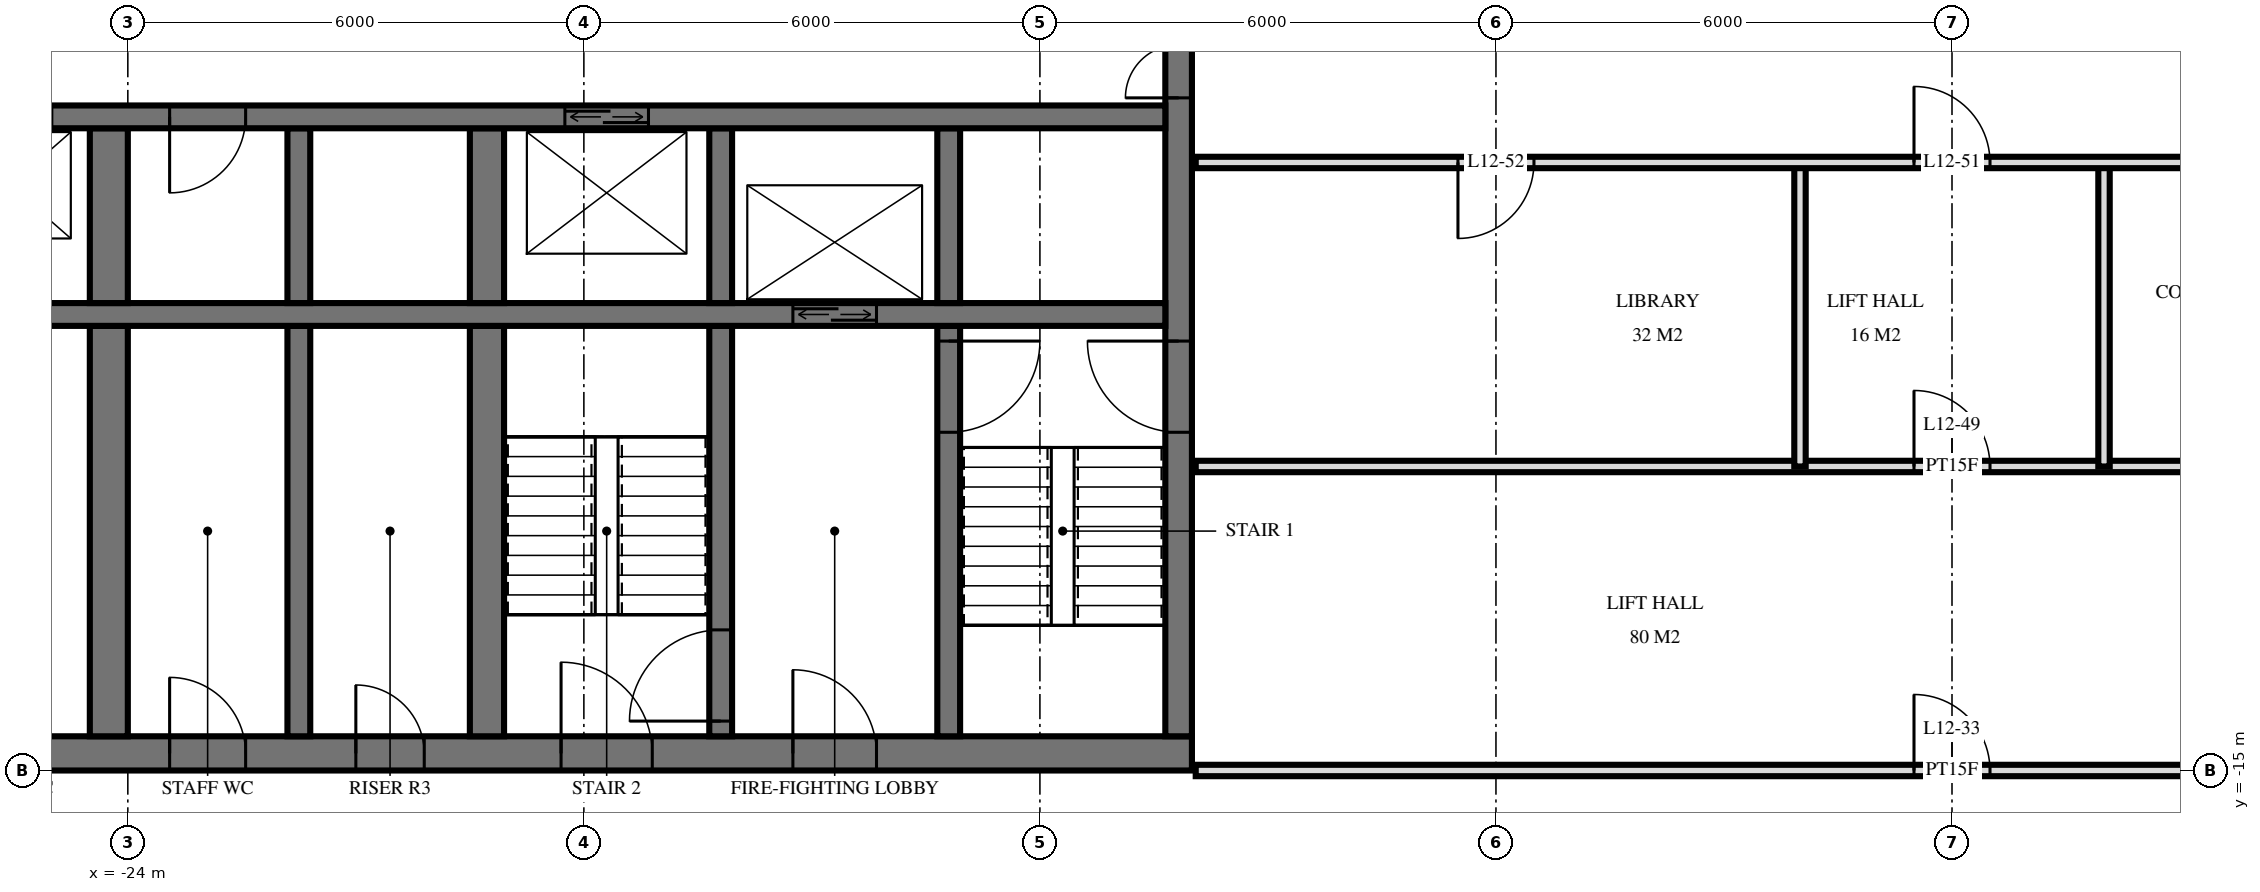
"""IFC4 building model, lengths in metres.
Left out: names, types, materials, properties, quantities, classifications, styles, units other than length and angle.
Written with IfcOpenShell. Run it as: python <this file> out.ifc"""

import sys

from ifc_helpers import new_model, si_unit, direction, frame, frame_2d, origin, place, context, subcontext, project, spatial, rectangle, extrude, element, fill, save


model = new_model("IFC4")
c1 = context("Model", 3, precision=1e-05, world=origin(), true_north=direction((0.0, 1.0)))
c2 = subcontext(c1, "Body", "Model", "MODEL_VIEW")
j1 = project(units=[si_unit("LENGTHUNIT", "METRE"), si_unit("PLANEANGLEUNIT", "RADIAN")], contexts=[c1])
p1 = place(None, origin())
s1 = spatial("IfcSite", under=j1, at=p1, CompositionType="ELEMENT")
p2 = place(p1, origin())
s2 = spatial("IfcBuilding", under=s1, at=p2, CompositionType="ELEMENT")
p3 = place(p2, frame((0.0, 0.0, 52.8)))
s3 = spatial("IfcBuildingStorey", under=s2, at=p3, CompositionType="ELEMENT", Elevation=52.8)
p4 = place(p3, frame((-29.5, -14.775, 0.0), z_axis=(0.0, 0.0, 1.0), x_axis=(1.0, 0.0, 0.0)))
e1 = element("IfcWall", 1, at=p4, inside=s3, PredefinedType="SHEAR", context=c2, shape_type="SweptSolid", body=[
    extrude(rectangle(XDim=19.5, YDim=0.45, at=frame_2d((9.75, 0.0))), origin(), (0.0, 0.0, 1.0), 3.6),
])
p5 = place(p4, frame((11.2, 0.0, 0.0)))
e2 = element("IfcOpeningElement", 2, at=p5, cuts=e1, PredefinedType="OPENING", context=c2, shape_type="SweptSolid", body=[
    extrude(rectangle(XDim=1.2, YDim=2.1, at=frame_2d((0.6, 1.05))), frame((0.0, 0.235, 0.0), z_axis=(0.0, -1.0, 0.0), x_axis=(1.0, 0.0, 0.0)), (0.0, 0.0, 1.0), 0.47),
])
p6 = place(p4, frame((14.25, 0.0, 0.0)))
e3 = element("IfcOpeningElement", 3, at=p6, cuts=e1, PredefinedType="OPENING", context=c2, shape_type="SweptSolid", body=[
    extrude(rectangle(XDim=1.1, YDim=2.1, at=frame_2d((0.55, 1.05))), frame((0.0, 0.235, 0.0), z_axis=(0.0, -1.0, 0.0), x_axis=(1.0, 0.0, 0.0)), (0.0, 0.0, 1.0), 0.47),
])
p7 = place(p4, frame((8.5, 0.0, 0.0)))
e4 = element("IfcOpeningElement", 4, at=p7, cuts=e1, PredefinedType="OPENING", context=c2, shape_type="SweptSolid", body=[
    extrude(rectangle(XDim=0.9, YDim=2.1, at=frame_2d((0.45, 1.05))), frame((0.0, 0.235, 0.0), z_axis=(0.0, -1.0, 0.0), x_axis=(1.0, 0.0, 0.0)), (0.0, 0.0, 1.0), 0.47),
])
p8 = place(p4, frame((6.05, 0.0, 0.0)))
e5 = element("IfcOpeningElement", 5, at=p8, cuts=e1, PredefinedType="OPENING", context=c2, shape_type="SweptSolid", body=[
    extrude(rectangle(XDim=1.0, YDim=2.1, at=frame_2d((0.5, 1.05))), frame((0.0, 0.235, 0.0), z_axis=(0.0, -1.0, 0.0), x_axis=(1.0, 0.0, 0.0)), (0.0, 0.0, 1.0), 0.47),
])
p9 = place(p4, frame((3.413, 0.0, 0.0)))
e6 = element("IfcOpeningElement", 6, at=p9, cuts=e1, PredefinedType="OPENING", context=c2, shape_type="SweptSolid", body=[
    extrude(rectangle(XDim=1.0, YDim=2.1, at=frame_2d((0.5, 1.05))), frame((0.0, 0.235, 0.0), z_axis=(0.0, -1.0, 0.0), x_axis=(1.0, 0.0, 0.0)), (0.0, 0.0, 1.0), 0.47),
])
p10 = place(p4, frame((1.087, 0.0, 0.0)))
e7 = element("IfcOpeningElement", 7, at=p10, cuts=e1, PredefinedType="OPENING", context=c2, shape_type="SweptSolid", body=[
    extrude(rectangle(XDim=1.0, YDim=2.1, at=frame_2d((0.5, 1.05))), frame((0.0, 0.235, 0.0), z_axis=(0.0, -1.0, 0.0), x_axis=(1.0, 0.0, 0.0)), (0.0, 0.0, 1.0), 0.47),
])
p11 = place(p3, frame((-10.175, -14.55, 0.0), z_axis=(0.0, 0.0, 1.0), x_axis=(0.0, 1.0, 0.0)))
e8 = element("IfcWall", 8, at=p11, inside=s3, PredefinedType="SHEAR", context=c2, shape_type="SweptSolid", body=[
    extrude(rectangle(XDim=14.1, YDim=0.35, at=frame_2d((7.05, 0.0))), origin(), (0.0, 0.0, 1.0), 3.6),
])
p12 = place(p11, frame((8.4, 0.0, 0.0)))
e9 = element("IfcOpeningElement", 9, at=p12, cuts=e8, PredefinedType="OPENING", context=c2, shape_type="SweptSolid", body=[
    extrude(rectangle(XDim=1.4, YDim=2.4, at=frame_2d((0.7, 1.2))), frame((0.0, 0.185, 0.0), z_axis=(0.0, -1.0, 0.0), x_axis=(1.0, 0.0, 0.0)), (0.0, 0.0, 1.0), 0.37),
])
p13 = place(p11, frame((10.0, 0.0, 0.0)))
e10 = element("IfcOpeningElement", 10, at=p13, cuts=e8, PredefinedType="OPENING", context=c2, shape_type="SweptSolid", body=[
    extrude(rectangle(XDim=1.4, YDim=2.4, at=frame_2d((0.7, 1.2))), frame((0.0, 0.185, 0.0), z_axis=(0.0, -1.0, 0.0), x_axis=(1.0, 0.0, 0.0)), (0.0, 0.0, 1.0), 0.37),
])
p14 = place(p11, frame((4.0, 0.0, 0.0)))
e11 = element("IfcOpeningElement", 11, at=p14, cuts=e8, PredefinedType="OPENING", context=c2, shape_type="SweptSolid", body=[
    extrude(rectangle(XDim=1.2, YDim=2.1, at=frame_2d((0.6, 1.05))), frame((0.0, 0.185, 0.0), z_axis=(0.0, -1.0, 0.0), x_axis=(1.0, 0.0, 0.0)), (0.0, 0.0, 1.0), 0.37),
])
p15 = place(p3, frame((-29.05, -6.4, 0.0), z_axis=(0.0, 0.0, 1.0), x_axis=(1.0, 0.0, 0.0)))
e12 = element("IfcWall", 12, at=p15, inside=s3, PredefinedType="SHEAR", context=c2, shape_type="SweptSolid", body=[
    extrude(rectangle(XDim=18.7, YDim=0.3, at=frame_2d((9.35, 0.0))), origin(), (0.0, 0.0, 1.0), 3.6),
])
p16 = place(p15, frame((2.95, 0.0, 0.0)))
e13 = element("IfcOpeningElement", 13, at=p16, cuts=e12, PredefinedType="OPENING", context=c2, shape_type="SweptSolid", body=[
    extrude(rectangle(XDim=1.1, YDim=2.1, at=frame_2d((0.55, 1.05))), frame((0.0, 0.16, 0.0), z_axis=(0.0, -1.0, 0.0), x_axis=(1.0, 0.0, 0.0)), (0.0, 0.0, 1.0), 0.32),
])
p17 = place(p15, frame((0.55, 0.0, 0.0)))
e14 = element("IfcOpeningElement", 14, at=p17, cuts=e12, PredefinedType="OPENING", context=c2, shape_type="SweptSolid", body=[
    extrude(rectangle(XDim=1.1, YDim=2.1, at=frame_2d((0.55, 1.05))), frame((0.0, 0.16, 0.0), z_axis=(0.0, -1.0, 0.0), x_axis=(1.0, 0.0, 0.0)), (0.0, 0.0, 1.0), 0.32),
])
p18 = place(p15, frame((10.8, 0.0, 0.0)))
e15 = element("IfcOpeningElement", 15, at=p18, cuts=e12, PredefinedType="OPENING", context=c2, shape_type="SweptSolid", body=[
    extrude(rectangle(XDim=1.1, YDim=2.1, at=frame_2d((0.55, 1.05))), frame((0.0, 0.16, 0.0), z_axis=(0.0, -1.0, 0.0), x_axis=(1.0, 0.0, 0.0)), (0.0, 0.0, 1.0), 0.32),
])
p19 = place(p15, frame((5.6, 0.0, 0.0)))
e16 = element("IfcOpeningElement", 16, at=p19, cuts=e12, PredefinedType="OPENING", context=c2, shape_type="SweptSolid", body=[
    extrude(rectangle(XDim=1.0, YDim=2.1, at=frame_2d((0.5, 1.05))), frame((0.0, 0.16, 0.0), z_axis=(0.0, -1.0, 0.0), x_axis=(1.0, 0.0, 0.0)), (0.0, 0.0, 1.0), 0.32),
])
p20 = place(p3, frame((-29.05, -9.0, 0.0), z_axis=(0.0, 0.0, 1.0), x_axis=(1.0, 0.0, 0.0)))
e17 = element("IfcWall", 17, at=p20, inside=s3, PredefinedType="SHEAR", context=c2, shape_type="SweptSolid", body=[
    extrude(rectangle(XDim=18.7, YDim=0.3, at=frame_2d((9.35, 0.0))), origin(), (0.0, 0.0, 1.0), 3.6),
])
p21 = place(p20, frame((13.8, 0.0, 0.0)))
e18 = element("IfcOpeningElement", 18, at=p21, cuts=e17, PredefinedType="OPENING", context=c2, shape_type="SweptSolid", body=[
    extrude(rectangle(XDim=1.1, YDim=2.1, at=frame_2d((0.55, 1.05))), frame((0.0, 0.16, 0.0), z_axis=(0.0, -1.0, 0.0), x_axis=(1.0, 0.0, 0.0)), (0.0, 0.0, 1.0), 0.32),
])
p22 = place(p3, frame((-13.2, -8.85, 0.0), z_axis=(0.0, 0.0, 1.0), x_axis=(0.0, 1.0, 0.0)))
e19 = element("IfcWall", 19, at=p22, inside=s3, PredefinedType="SHEAR", context=c2, shape_type="SweptSolid", body=[
    extrude(rectangle(XDim=2.3, YDim=0.3, at=frame_2d((1.15, 0.0))), origin(), (0.0, 0.0, 1.0), 3.6),
])
p23 = place(p3, frame((-13.2, -14.55, 0.0), z_axis=(0.0, 0.0, 1.0), x_axis=(0.0, 1.0, 0.0)))
e20 = element("IfcWall", 20, at=p23, inside=s3, PredefinedType="SHEAR", context=c2, shape_type="SweptSolid", body=[
    extrude(rectangle(XDim=5.4, YDim=0.3, at=frame_2d((2.7, 0.0))), origin(), (0.0, 0.0, 1.0), 3.6),
])
p24 = place(p23, frame((4.0, 0.0, 0.0)))
e21 = element("IfcOpeningElement", 21, at=p24, cuts=e20, PredefinedType="OPENING", context=c2, shape_type="SweptSolid", body=[
    extrude(rectangle(XDim=1.2, YDim=2.1, at=frame_2d((0.6, 1.05))), frame((0.0, 0.16, 0.0), z_axis=(0.0, -1.0, 0.0), x_axis=(1.0, 0.0, 0.0)), (0.0, 0.0, 1.0), 0.32),
])
p25 = place(p3, frame((-16.2, -8.85, 0.0), z_axis=(0.0, 0.0, 1.0), x_axis=(0.0, 1.0, 0.0)))
e22 = element("IfcWall", 22, at=p25, inside=s3, PredefinedType="SHEAR", context=c2, shape_type="SweptSolid", body=[
    extrude(rectangle(XDim=2.3, YDim=0.3, at=frame_2d((1.15, 0.0))), origin(), (0.0, 0.0, 1.0), 3.6),
])
p26 = place(p3, frame((-16.2, -14.55, 0.0), z_axis=(0.0, 0.0, 1.0), x_axis=(0.0, 1.0, 0.0)))
e23 = element("IfcWall", 23, at=p26, inside=s3, PredefinedType="SHEAR", context=c2, shape_type="SweptSolid", body=[
    extrude(rectangle(XDim=5.4, YDim=0.3, at=frame_2d((2.7, 0.0))), origin(), (0.0, 0.0, 1.0), 3.6),
])
p27 = place(p26, frame((0.2, 0.0, 0.0)))
e24 = element("IfcOpeningElement", 24, at=p27, cuts=e23, PredefinedType="OPENING", context=c2, shape_type="SweptSolid", body=[
    extrude(rectangle(XDim=1.2, YDim=2.1, at=frame_2d((0.6, 1.05))), frame((0.0, 0.16, 0.0), z_axis=(0.0, -1.0, 0.0), x_axis=(1.0, 0.0, 0.0)), (0.0, 0.0, 1.0), 0.32),
])
p28 = place(p3, frame((-19.275, -8.85, 0.0), z_axis=(0.0, 0.0, 1.0), x_axis=(0.0, 1.0, 0.0)))
e25 = element("IfcWall", 25, at=p28, inside=s3, PredefinedType="SHEAR", context=c2, shape_type="SweptSolid", body=[
    extrude(rectangle(XDim=2.3, YDim=0.45, at=frame_2d((1.15, 0.0))), origin(), (0.0, 0.0, 1.0), 3.6),
])
p29 = place(p3, frame((-19.275, -14.55, 0.0), z_axis=(0.0, 0.0, 1.0), x_axis=(0.0, 1.0, 0.0)))
e26 = element("IfcWall", 26, at=p29, inside=s3, PredefinedType="SHEAR", context=c2, shape_type="SweptSolid", body=[
    extrude(rectangle(XDim=5.4, YDim=0.45, at=frame_2d((2.7, 0.0))), origin(), (0.0, 0.0, 1.0), 3.6),
])
p30 = place(p3, frame((-21.75, -8.85, 0.0), z_axis=(0.0, 0.0, 1.0), x_axis=(0.0, 1.0, 0.0)))
e27 = element("IfcWall", 27, at=p30, inside=s3, PredefinedType="SHEAR", context=c2, shape_type="SweptSolid", body=[
    extrude(rectangle(XDim=2.3, YDim=0.3, at=frame_2d((1.15, 0.0))), origin(), (0.0, 0.0, 1.0), 3.6),
])
p31 = place(p3, frame((-21.75, -14.55, 0.0), z_axis=(0.0, 0.0, 1.0), x_axis=(0.0, 1.0, 0.0)))
e28 = element("IfcWall", 28, at=p31, inside=s3, PredefinedType="SHEAR", context=c2, shape_type="SweptSolid", body=[
    extrude(rectangle(XDim=5.4, YDim=0.3, at=frame_2d((2.7, 0.0))), origin(), (0.0, 0.0, 1.0), 3.6),
])
p32 = place(p3, frame((-24.25, -8.85, 0.0), z_axis=(0.0, 0.0, 1.0), x_axis=(0.0, 1.0, 0.0)))
e29 = element("IfcWall", 29, at=p32, inside=s3, PredefinedType="SHEAR", context=c2, shape_type="SweptSolid", body=[
    extrude(rectangle(XDim=2.3, YDim=0.5, at=frame_2d((1.15, 0.0))), origin(), (0.0, 0.0, 1.0), 3.6),
])
p33 = place(p3, frame((-24.25, -14.55, 0.0), z_axis=(0.0, 0.0, 1.0), x_axis=(0.0, 1.0, 0.0)))
e30 = element("IfcWall", 30, at=p33, inside=s3, PredefinedType="SHEAR", context=c2, shape_type="SweptSolid", body=[
    extrude(rectangle(XDim=5.4, YDim=0.5, at=frame_2d((2.7, 0.0))), origin(), (0.0, 0.0, 1.0), 3.6),
])
for number, where, z_axis, x_axis in (
    (31, (2.0, -11.0, 0.0), (0.0, 0.0, 1.0), (0.0, 1.0, 0.0)),
    (32, (-2.0, -11.0, 0.0), (0.0, 0.0, 1.0), (0.0, 1.0, 0.0)),
):
    element("IfcWall", number, at=place(p3, frame(where, z_axis=z_axis, x_axis=x_axis)), inside=s3, PredefinedType="PARTITIONING", context=c2, shape_type="SweptSolid", body=[
        extrude(rectangle(XDim=4.0, YDim=0.15, at=frame_2d((2.0, 0.0))), origin(), (0.0, 0.0, 1.0), 3.32),
    ])
p34 = place(p3, frame((-9.95, -15.0, 0.0), z_axis=(0.0, 0.0, 1.0), x_axis=(1.0, 0.0, 0.0)))
e33 = element("IfcWall", 33, at=p34, inside=s3, PredefinedType="PARTITIONING", context=c2, shape_type="SweptSolid", body=[
    extrude(rectangle(XDim=19.9, YDim=0.15, at=frame_2d((9.95, 0.0))), origin(), (0.0, 0.0, 1.0), 2.684),
])
p35 = place(p34, frame((9.45, 0.0, 0.0)))
e34 = element("IfcOpeningElement", 34, at=p35, cuts=e33, PredefinedType="OPENING", context=c2, shape_type="SweptSolid", body=[
    extrude(rectangle(XDim=1.0, YDim=2.1, at=frame_2d((0.5, 1.05))), frame((0.0, 0.085, 0.0), z_axis=(0.0, -1.0, 0.0), x_axis=(1.0, 0.0, 0.0)), (0.0, 0.0, 1.0), 0.17),
])
p36 = place(p3, frame((-9.95, -11.0, 0.0), z_axis=(0.0, 0.0, 1.0), x_axis=(1.0, 0.0, 0.0)))
e35 = element("IfcWall", 35, at=p36, inside=s3, PredefinedType="PARTITIONING", context=c2, shape_type="SweptSolid", body=[
    extrude(rectangle(XDim=19.9, YDim=0.15, at=frame_2d((9.95, 0.0))), origin(), (0.0, 0.0, 1.0), 3.32),
])
p37 = place(p36, frame((9.45, 0.0, 0.0)))
e36 = element("IfcOpeningElement", 36, at=p37, cuts=e35, PredefinedType="OPENING", context=c2, shape_type="SweptSolid", body=[
    extrude(rectangle(XDim=1.0, YDim=2.1, at=frame_2d((0.5, 1.05))), frame((0.0, 0.085, 0.0), z_axis=(0.0, -1.0, 0.0), x_axis=(1.0, 0.0, 0.0)), (0.0, 0.0, 1.0), 0.17),
])
p38 = place(p36, frame((15.45, 0.0, 0.0)))
e37 = element("IfcOpeningElement", 37, at=p38, cuts=e35, PredefinedType="OPENING", context=c2, shape_type="SweptSolid", body=[
    extrude(rectangle(XDim=1.0, YDim=2.1, at=frame_2d((0.5, 1.05))), frame((0.0, 0.085, 0.0), z_axis=(0.0, -1.0, 0.0), x_axis=(1.0, 0.0, 0.0)), (0.0, 0.0, 1.0), 0.17),
])
p39 = place(p3, frame((-9.95, -7.0, 0.0), z_axis=(0.0, 0.0, 1.0), x_axis=(1.0, 0.0, 0.0)))
e38 = element("IfcWall", 38, at=p39, inside=s3, PredefinedType="PARTITIONING", context=c2, shape_type="SweptSolid", body=[
    extrude(rectangle(XDim=19.9, YDim=0.15, at=frame_2d((9.95, 0.0))), origin(), (0.0, 0.0, 1.0), 3.32),
])
p40 = place(p39, frame((9.45, 0.0, 0.0)))
e39 = element("IfcOpeningElement", 39, at=p40, cuts=e38, PredefinedType="OPENING", context=c2, shape_type="SweptSolid", body=[
    extrude(rectangle(XDim=1.0, YDim=2.1, at=frame_2d((0.5, 1.05))), frame((0.0, 0.085, 0.0), z_axis=(0.0, -1.0, 0.0), x_axis=(1.0, 0.0, 0.0)), (0.0, 0.0, 1.0), 0.17),
])
p41 = place(p39, frame((3.45, 0.0, 0.0)))
e40 = element("IfcOpeningElement", 40, at=p41, cuts=e38, PredefinedType="OPENING", context=c2, shape_type="SweptSolid", body=[
    extrude(rectangle(XDim=1.0, YDim=2.1, at=frame_2d((0.5, 1.05))), frame((0.0, 0.085, 0.0), z_axis=(0.0, -1.0, 0.0), x_axis=(1.0, 0.0, 0.0)), (0.0, 0.0, 1.0), 0.17),
])
p42 = place(p21, origin())
e41 = element("IfcDoor", 41, at=p42, inside=s3, OperationType="DOUBLE_DOOR_SLIDING", PredefinedType="USERDEFINED", context=c2, shape_type="SweptSolid", body=[
    extrude(rectangle(XDim=1.1, YDim=2.1, at=frame_2d((0.55, 1.05))), frame((0.0, 0.025, 0.0), z_axis=(0.0, -1.0, 0.0), x_axis=(1.0, 0.0, 0.0)), (0.0, 0.0, 1.0), 0.05),
])
fill(e18, e41)
p43 = place(p18, origin())
e42 = element("IfcDoor", 42, at=p43, inside=s3, OperationType="DOUBLE_DOOR_SLIDING", PredefinedType="USERDEFINED", context=c2, shape_type="SweptSolid", body=[
    extrude(rectangle(XDim=1.1, YDim=2.1, at=frame_2d((0.55, 1.05))), frame((0.0, 0.025, 0.0), z_axis=(0.0, -1.0, 0.0), x_axis=(1.0, 0.0, 0.0)), (0.0, 0.0, 1.0), 0.05),
])
fill(e15, e42)
p44 = place(p12, origin())
e43 = element("IfcDoor", 43, at=p44, inside=s3, OperationType="DOUBLE_DOOR_SINGLE_SWING", PredefinedType="DOOR", context=c2, shape_type="SweptSolid", body=[
    extrude(rectangle(XDim=1.4, YDim=2.4, at=frame_2d((0.7, 1.2))), frame((0.0, 0.025, 0.0), z_axis=(0.0, -1.0, 0.0), x_axis=(1.0, 0.0, 0.0)), (0.0, 0.0, 1.0), 0.05),
])
fill(e9, e43)
p45 = place(p14, origin())
e44 = element("IfcDoor", 44, at=p45, inside=s3, OperationType="SINGLE_SWING_LEFT", PredefinedType="DOOR", context=c2, shape_type="SweptSolid", body=[
    extrude(rectangle(XDim=1.2, YDim=2.1, at=frame_2d((0.6, 1.05))), frame((0.0, 0.025, 0.0), z_axis=(0.0, -1.0, 0.0), x_axis=(1.0, 0.0, 0.0)), (0.0, 0.0, 1.0), 0.05),
])
fill(e11, e44)
p46 = place(p5, origin())
e45 = element("IfcDoor", 45, at=p46, inside=s3, OperationType="SINGLE_SWING_RIGHT", PredefinedType="DOOR", context=c2, shape_type="SweptSolid", body=[
    extrude(rectangle(XDim=1.2, YDim=2.1, at=frame_2d((0.6, 1.05))), frame((0.0, 0.025, 0.0), z_axis=(0.0, -1.0, 0.0), x_axis=(1.0, 0.0, 0.0)), (0.0, 0.0, 1.0), 0.05),
])
fill(e2, e45)
p47 = place(p6, origin())
e46 = element("IfcDoor", 46, at=p47, inside=s3, OperationType="SINGLE_SWING_RIGHT", PredefinedType="DOOR", context=c2, shape_type="SweptSolid", body=[
    extrude(rectangle(XDim=1.1, YDim=2.1, at=frame_2d((0.55, 1.05))), frame((0.0, 0.025, 0.0), z_axis=(0.0, -1.0, 0.0), x_axis=(1.0, 0.0, 0.0)), (0.0, 0.0, 1.0), 0.05),
])
fill(e3, e46)
p48 = place(p7, origin())
e47 = element("IfcDoor", 47, at=p48, inside=s3, OperationType="SINGLE_SWING_RIGHT", PredefinedType="DOOR", context=c2, shape_type="SweptSolid", body=[
    extrude(rectangle(XDim=0.9, YDim=2.1, at=frame_2d((0.45, 1.05))), frame((0.0, 0.025, 0.0), z_axis=(0.0, -1.0, 0.0), x_axis=(1.0, 0.0, 0.0)), (0.0, 0.0, 1.0), 0.05),
])
fill(e4, e47)
p49 = place(p8, origin())
e48 = element("IfcDoor", 48, at=p49, inside=s3, OperationType="SINGLE_SWING_RIGHT", PredefinedType="DOOR", context=c2, shape_type="SweptSolid", body=[
    extrude(rectangle(XDim=1.0, YDim=2.1, at=frame_2d((0.5, 1.05))), frame((0.0, 0.025, 0.0), z_axis=(0.0, -1.0, 0.0), x_axis=(1.0, 0.0, 0.0)), (0.0, 0.0, 1.0), 0.05),
])
fill(e5, e48)
p50 = place(p19, frame((0.5, 0.0, 0.0), z_axis=(0.0, 0.0, 1.0), x_axis=(-1.0, 0.0, 0.0)))
e49 = element("IfcDoor", 49, at=p50, inside=s3, OperationType="SINGLE_SWING_LEFT", PredefinedType="DOOR", context=c2, shape_type="SweptSolid", body=[
    extrude(rectangle(XDim=1.0, YDim=2.1, at=frame_2d((0.0, 1.05))), frame((0.0, -0.025, 0.0), z_axis=(0.0, 1.0, 0.0), x_axis=(-1.0, 0.0, 0.0)), (0.0, 0.0, 1.0), 0.05),
])
fill(e16, e49)
p51 = place(p24, frame((0.6, 0.0, 0.0), z_axis=(0.0, 0.0, 1.0), x_axis=(-1.0, 0.0, 0.0)))
e50 = element("IfcDoor", 50, at=p51, inside=s3, OperationType="SINGLE_SWING_RIGHT", PredefinedType="DOOR", context=c2, shape_type="SweptSolid", body=[
    extrude(rectangle(XDim=1.2, YDim=2.1, at=frame_2d((0.0, 1.05))), frame((0.0, -0.025, 0.0), z_axis=(0.0, 1.0, 0.0), x_axis=(-1.0, 0.0, 0.0)), (0.0, 0.0, 1.0), 0.05),
])
fill(e21, e50)
p52 = place(p27, origin())
e51 = element("IfcDoor", 51, at=p52, inside=s3, OperationType="SINGLE_SWING_RIGHT", PredefinedType="DOOR", context=c2, shape_type="SweptSolid", body=[
    extrude(rectangle(XDim=1.2, YDim=2.1, at=frame_2d((0.6, 1.05))), frame((0.0, 0.025, 0.0), z_axis=(0.0, -1.0, 0.0), x_axis=(1.0, 0.0, 0.0)), (0.0, 0.0, 1.0), 0.05),
])
fill(e24, e51)
p53 = place(p35, origin())
e52 = element("IfcDoor", 52, at=p53, inside=s3, OperationType="SINGLE_SWING_RIGHT", PredefinedType="DOOR", context=c2, shape_type="SweptSolid", body=[
    extrude(rectangle(XDim=1.0, YDim=2.1, at=frame_2d((0.5, 1.05))), frame((0.0, 0.025, 0.0), z_axis=(0.0, -1.0, 0.0), x_axis=(1.0, 0.0, 0.0)), (0.0, 0.0, 1.0), 0.05),
])
fill(e34, e52)
p54 = place(p37, origin())
e53 = element("IfcDoor", 53, at=p54, inside=s3, OperationType="SINGLE_SWING_RIGHT", PredefinedType="DOOR", context=c2, shape_type="SweptSolid", body=[
    extrude(rectangle(XDim=1.0, YDim=2.1, at=frame_2d((0.5, 1.05))), frame((0.0, 0.025, 0.0), z_axis=(0.0, -1.0, 0.0), x_axis=(1.0, 0.0, 0.0)), (0.0, 0.0, 1.0), 0.05),
])
fill(e36, e53)
p55 = place(p40, origin())
e54 = element("IfcDoor", 54, at=p55, inside=s3, OperationType="SINGLE_SWING_RIGHT", PredefinedType="DOOR", context=c2, shape_type="SweptSolid", body=[
    extrude(rectangle(XDim=1.0, YDim=2.1, at=frame_2d((0.5, 1.05))), frame((0.0, 0.025, 0.0), z_axis=(0.0, -1.0, 0.0), x_axis=(1.0, 0.0, 0.0)), (0.0, 0.0, 1.0), 0.05),
])
fill(e39, e54)
p56 = place(p41, frame((0.5, 0.0, 0.0), z_axis=(0.0, 0.0, 1.0), x_axis=(-1.0, 0.0, 0.0)))
e55 = element("IfcDoor", 55, at=p56, inside=s3, OperationType="SINGLE_SWING_LEFT", PredefinedType="DOOR", context=c2, shape_type="SweptSolid", body=[
    extrude(rectangle(XDim=1.0, YDim=2.1, at=frame_2d((0.0, 1.05))), frame((0.0, -0.025, 0.0), z_axis=(0.0, 1.0, 0.0), x_axis=(-1.0, 0.0, 0.0)), (0.0, 0.0, 1.0), 0.05),
])
fill(e40, e55)
save(model, sys.argv[1])
